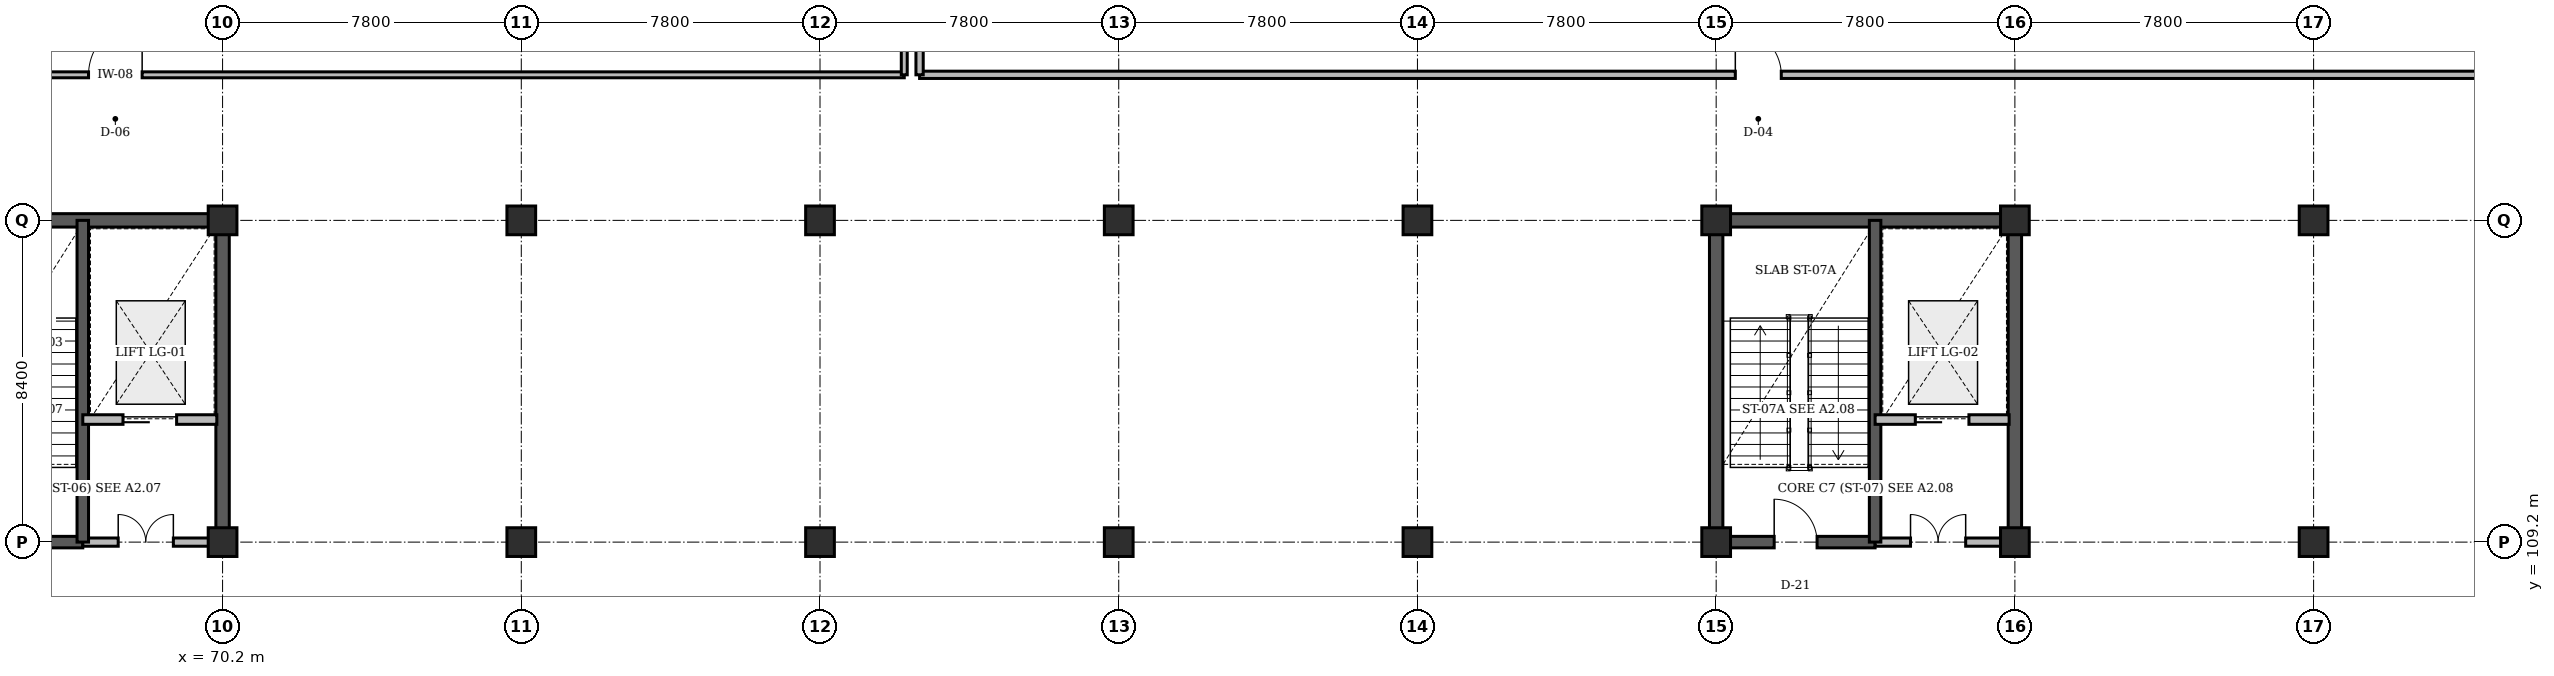
"""IFC4 building model, lengths in metres.
Left out: names, types, materials, properties, quantities, classifications, styles, units other than length and angle.
Written with IfcOpenShell. Run it as: python <this file> out.ifc"""

import sys

from ifc_helpers import new_model, si_unit, direction, frame, frame_2d, origin, origin_2d, place, context, subcontext, project, spatial, rectangle, extrude, element, fill, save


model = new_model("IFC4")
c1 = context("Model", 3, precision=1e-05, world=origin(), true_north=direction((0.0, 1.0)))
c2 = subcontext(c1, "Body", "Model", "MODEL_VIEW")
j1 = project(units=[si_unit("LENGTHUNIT", "METRE"), si_unit("PLANEANGLEUNIT", "RADIAN")], contexts=[c1])
p1 = place(None, origin())
s1 = spatial("IfcSite", under=j1, at=p1, CompositionType="ELEMENT")
p2 = place(p1, origin())
s2 = spatial("IfcBuilding", under=s1, at=p2, CompositionType="ELEMENT")
p3 = place(p2, frame((0.0, 0.0, 4.8)))
s3 = spatial("IfcBuildingStorey", under=s2, at=p3, CompositionType="ELEMENT", Elevation=4.8)
p4 = place(p3, frame((62.225, 117.6, 0.0), z_axis=(0.0, 0.0, 1.0), x_axis=(1.0, 0.0, 0.0)))
e1 = element("IfcWall", 1, at=p4, inside=s3, PredefinedType="SHEAR", context=c2, shape_type="SweptSolid", body=[
    extrude(rectangle(XDim=8.15, YDim=0.35, at=frame_2d((4.075, 0.0))), origin(), (0.0, 0.0, 1.0), 4.48),
])
p5 = place(p3, frame((70.2, 109.2, 0.0), z_axis=(0.0, 0.0, 1.0), x_axis=(0.0, 1.0, 0.0)))
e2 = element("IfcWall", 2, at=p5, inside=s3, PredefinedType="SHEAR", context=c2, shape_type="SweptSolid", body=[
    extrude(rectangle(XDim=8.4, YDim=0.35, at=frame_2d((4.2, 0.0))), origin(), (0.0, 0.0, 1.0), 4.48),
])
p6 = place(p3, frame((109.025, 117.6, 0.0), z_axis=(0.0, 0.0, 1.0), x_axis=(1.0, 0.0, 0.0)))
e3 = element("IfcWall", 3, at=p6, inside=s3, PredefinedType="SHEAR", context=c2, shape_type="SweptSolid", body=[
    extrude(rectangle(XDim=8.15, YDim=0.35, at=frame_2d((4.075, 0.0))), origin(), (0.0, 0.0, 1.0), 4.48),
])
for number, where, z_axis, x_axis in (
    (4, (109.2, 109.2, 0.0), (0.0, 0.0, 1.0), (0.0, 1.0, 0.0)),
    (5, (117.0, 109.2, 0.0), (0.0, 0.0, 1.0), (0.0, 1.0, 0.0)),
):
    element("IfcWall", number, at=place(p3, frame(where, z_axis=z_axis, x_axis=x_axis)), inside=s3, PredefinedType="SHEAR", context=c2, shape_type="SweptSolid", body=[
        extrude(rectangle(XDim=8.4, YDim=0.35, at=frame_2d((4.2, 0.0))), origin(), (0.0, 0.0, 1.0), 4.48),
    ])
for number, where, z_axis, x_axis in (
    (6, (70.2, 109.2, 0.0), (0.0, 0.0, 1.0), (1.0, 0.0, 0.0)),
    (7, (70.2, 117.6, 0.0), (0.0, 0.0, 1.0), (1.0, 0.0, 0.0)),
    (8, (78.0, 109.2, 0.0), (0.0, 0.0, 1.0), (1.0, 0.0, 0.0)),
    (9, (78.0, 117.6, 0.0), (0.0, 0.0, 1.0), (1.0, 0.0, 0.0)),
    (10, (85.8, 109.2, 0.0), (0.0, 0.0, 1.0), (1.0, 0.0, 0.0)),
    (11, (85.8, 117.6, 0.0), (0.0, 0.0, 1.0), (1.0, 0.0, 0.0)),
    (12, (93.6, 109.2, 0.0), (0.0, 0.0, 1.0), (1.0, 0.0, 0.0)),
    (13, (93.6, 117.6, 0.0), (0.0, 0.0, 1.0), (1.0, 0.0, 0.0)),
    (14, (101.4, 109.2, 0.0), (0.0, 0.0, 1.0), (1.0, 0.0, 0.0)),
    (15, (101.4, 117.6, 0.0), (0.0, 0.0, 1.0), (1.0, 0.0, 0.0)),
    (16, (109.2, 109.2, 0.0), (0.0, 0.0, 1.0), (1.0, 0.0, 0.0)),
    (17, (109.2, 117.6, 0.0), (0.0, 0.0, 1.0), (1.0, 0.0, 0.0)),
    (18, (117.0, 109.2, 0.0), (0.0, 0.0, 1.0), (1.0, 0.0, 0.0)),
    (19, (117.0, 117.6, 0.0), (0.0, 0.0, 1.0), (1.0, 0.0, 0.0)),
    (20, (124.8, 109.2, 0.0), (0.0, 0.0, 1.0), (1.0, 0.0, 0.0)),
    (21, (124.8, 117.6, 0.0), (0.0, 0.0, 1.0), (1.0, 0.0, 0.0)),
):
    element("IfcColumn", number, at=place(p3, frame(where, z_axis=z_axis, x_axis=x_axis)), inside=s3, PredefinedType="COLUMN", context=c2, shape_type="SweptSolid", body=[
        extrude(rectangle(XDim=0.75, YDim=0.75, at=origin_2d()), origin(), (0.0, 0.0, 1.0), 4.8),
    ])
p7 = place(p3, frame((62.4, 109.2, 0.0), z_axis=(0.0, 0.0, 1.0), x_axis=(1.0, 0.0, 0.0)))
e22 = element("IfcWall", 22, at=p7, inside=s3, PredefinedType="SHEAR", context=c2, shape_type="SweptSolid", body=[
    extrude(rectangle(XDim=4.15, YDim=0.3, at=frame_2d((2.075, 0.0))), origin(), (0.0, 0.0, 1.0), 4.8),
])
p8 = place(p7, frame((1.515, 0.0, 0.0)))
e23 = element("IfcOpeningElement", 23, at=p8, cuts=e22, PredefinedType="OPENING", context=c2, shape_type="SweptSolid", body=[
    extrude(rectangle(XDim=1.12, YDim=2.15, at=frame_2d((0.56, 1.075))), frame((0.0, 0.16, 0.0), z_axis=(0.0, -1.0, 0.0), x_axis=(1.0, 0.0, 0.0)), (0.0, 0.0, 1.0), 0.32),
])
p9 = place(p3, frame((66.55, 109.2, 0.0), z_axis=(0.0, 0.0, 1.0), x_axis=(1.0, 0.0, 0.0)))
e24 = element("IfcWall", 24, at=p9, inside=s3, PredefinedType="STANDARD", context=c2, shape_type="SweptSolid", body=[
    extrude(rectangle(XDim=3.29, YDim=0.215, at=frame_2d((1.645, 0.0))), origin(), (0.0, 0.0, 1.0), 3.68),
])
p10 = place(p9, frame((0.925, 0.0, 0.0)))
e25 = element("IfcOpeningElement", 25, at=p10, cuts=e24, PredefinedType="OPENING", context=c2, shape_type="SweptSolid", body=[
    extrude(rectangle(XDim=1.44, YDim=2.2, at=frame_2d((0.72, 1.1))), frame((0.0, 0.118, 0.0), z_axis=(0.0, -1.0, 0.0), x_axis=(1.0, 0.0, 0.0)), (0.0, 0.0, 1.0), 0.235),
])
p11 = place(p3, frame((66.55, 109.2, 0.0), z_axis=(0.0, 0.0, 1.0), x_axis=(0.0, 1.0, 0.0)))
e26 = element("IfcWall", 26, at=p11, inside=s3, PredefinedType="SHEAR", context=c2, shape_type="SweptSolid", body=[
    extrude(rectangle(XDim=8.4, YDim=0.3, at=frame_2d((4.2, 0.0))), origin(), (0.0, 0.0, 1.0), 4.8),
])
p12 = place(p3, frame((66.55, 112.4, 0.0), z_axis=(0.0, 0.0, 1.0), x_axis=(1.0, 0.0, 0.0)))
e27 = element("IfcWall", 27, at=p12, inside=s3, PredefinedType="STANDARD", context=c2, shape_type="SweptSolid", body=[
    extrude(rectangle(XDim=3.5, YDim=0.25, at=frame_2d((1.75, 0.0))), origin(), (0.0, 0.0, 1.0), 4.46),
])
p13 = place(p12, frame((1.05, 0.0, 0.0)))
e28 = element("IfcOpeningElement", 28, at=p13, cuts=e27, PredefinedType="OPENING", context=c2, shape_type="SweptSolid", body=[
    extrude(rectangle(XDim=1.4, YDim=2.2, at=frame_2d((0.7, 1.1))), frame((0.0, 0.135, 0.0), z_axis=(0.0, -1.0, 0.0), x_axis=(1.0, 0.0, 0.0)), (0.0, 0.0, 1.0), 0.27),
])
p14 = place(p3, frame((109.2, 109.2, 0.0), z_axis=(0.0, 0.0, 1.0), x_axis=(1.0, 0.0, 0.0)))
e29 = element("IfcWall", 29, at=p14, inside=s3, PredefinedType="SHEAR", context=c2, shape_type="SweptSolid", body=[
    extrude(rectangle(XDim=4.15, YDim=0.3, at=frame_2d((2.075, 0.0))), origin(), (0.0, 0.0, 1.0), 4.8),
])
p15 = place(p14, frame((1.515, 0.0, 0.0)))
e30 = element("IfcOpeningElement", 30, at=p15, cuts=e29, PredefinedType="OPENING", context=c2, shape_type="SweptSolid", body=[
    extrude(rectangle(XDim=1.12, YDim=2.15, at=frame_2d((0.56, 1.075))), frame((0.0, 0.16, 0.0), z_axis=(0.0, -1.0, 0.0), x_axis=(1.0, 0.0, 0.0)), (0.0, 0.0, 1.0), 0.32),
])
p16 = place(p3, frame((113.35, 109.2, 0.0), z_axis=(0.0, 0.0, 1.0), x_axis=(1.0, 0.0, 0.0)))
e31 = element("IfcWall", 31, at=p16, inside=s3, PredefinedType="STANDARD", context=c2, shape_type="SweptSolid", body=[
    extrude(rectangle(XDim=3.29, YDim=0.215, at=frame_2d((1.645, 0.0))), origin(), (0.0, 0.0, 1.0), 3.68),
])
p17 = place(p16, frame((0.925, 0.0, 0.0)))
e32 = element("IfcOpeningElement", 32, at=p17, cuts=e31, PredefinedType="OPENING", context=c2, shape_type="SweptSolid", body=[
    extrude(rectangle(XDim=1.44, YDim=2.2, at=frame_2d((0.72, 1.1))), frame((0.0, 0.118, 0.0), z_axis=(0.0, -1.0, 0.0), x_axis=(1.0, 0.0, 0.0)), (0.0, 0.0, 1.0), 0.235),
])
p18 = place(p3, frame((113.35, 109.2, 0.0), z_axis=(0.0, 0.0, 1.0), x_axis=(0.0, 1.0, 0.0)))
e33 = element("IfcWall", 33, at=p18, inside=s3, PredefinedType="SHEAR", context=c2, shape_type="SweptSolid", body=[
    extrude(rectangle(XDim=8.4, YDim=0.3, at=frame_2d((4.2, 0.0))), origin(), (0.0, 0.0, 1.0), 4.8),
])
p19 = place(p3, frame((113.35, 112.4, 0.0), z_axis=(0.0, 0.0, 1.0), x_axis=(1.0, 0.0, 0.0)))
e34 = element("IfcWall", 34, at=p19, inside=s3, PredefinedType="STANDARD", context=c2, shape_type="SweptSolid", body=[
    extrude(rectangle(XDim=3.5, YDim=0.25, at=frame_2d((1.75, 0.0))), origin(), (0.0, 0.0, 1.0), 4.46),
])
p20 = place(p19, frame((1.05, 0.0, 0.0)))
e35 = element("IfcOpeningElement", 35, at=p20, cuts=e34, PredefinedType="OPENING", context=c2, shape_type="SweptSolid", body=[
    extrude(rectangle(XDim=1.4, YDim=2.2, at=frame_2d((0.7, 1.1))), frame((0.0, 0.135, 0.0), z_axis=(0.0, -1.0, 0.0), x_axis=(1.0, 0.0, 0.0)), (0.0, 0.0, 1.0), 0.27),
])
p21 = place(p3, frame((46.8, 121.4, 0.0), z_axis=(0.0, 0.0, 1.0), x_axis=(1.0, 0.0, 0.0)))
e36 = element("IfcWall", 36, at=p21, inside=s3, PredefinedType="PARTITIONING", context=c2, shape_type="SweptSolid", body=[
    extrude(rectangle(XDim=41.2, YDim=0.155, at=frame_2d((20.6, 0.0))), origin(), (0.0, 0.0, 1.0), 4.46),
])
p22 = place(p21, frame((19.9, 0.0, 0.0)))
e37 = element("IfcOpeningElement", 37, at=p22, cuts=e36, PredefinedType="OPENING", context=c2, shape_type="SweptSolid", body=[
    extrude(rectangle(XDim=1.4, YDim=2.2, at=frame_2d((0.7, 1.1))), frame((0.0, 0.087, 0.0), z_axis=(0.0, -1.0, 0.0), x_axis=(1.0, 0.0, 0.0)), (0.0, 0.0, 1.0), 0.175),
])
p23 = place(p3, frame((88.0, 121.4, 0.0), z_axis=(0.0, 0.0, 1.0), x_axis=(0.0, 1.0, 0.0)))
e38 = element("IfcWall", 38, at=p23, inside=s3, PredefinedType="PARTITIONING", context=c2, shape_type="SweptSolid", body=[
    extrude(rectangle(XDim=12.4, YDim=0.155, at=frame_2d((6.2, 0.0))), origin(), (0.0, 0.0, 1.0), 4.46),
])
p24 = place(p3, frame((88.4, 121.4, 0.0), z_axis=(0.0, 0.0, 1.0), x_axis=(1.0, 0.0, 0.0)))
e39 = element("IfcWall", 39, at=p24, inside=s3, PredefinedType="PARTITIONING", context=c2, shape_type="SweptSolid", body=[
    extrude(rectangle(XDim=43.8, YDim=0.19, at=frame_2d((21.9, 0.0))), origin(), (0.0, 0.0, 1.0), 4.46),
])
p25 = place(p24, frame((21.3, 0.0, 0.0)))
e40 = element("IfcOpeningElement", 40, at=p25, cuts=e39, PredefinedType="OPENING", context=c2, shape_type="SweptSolid", body=[
    extrude(rectangle(XDim=1.2, YDim=2.2, at=frame_2d((0.6, 1.1))), frame((0.0, 0.105, 0.0), z_axis=(0.0, -1.0, 0.0), x_axis=(1.0, 0.0, 0.0)), (0.0, 0.0, 1.0), 0.21),
])
p26 = place(p3, frame((88.4, 121.4, 0.0), z_axis=(0.0, 0.0, 1.0), x_axis=(0.0, 1.0, 0.0)))
e41 = element("IfcWall", 41, at=p26, inside=s3, PredefinedType="PARTITIONING", context=c2, shape_type="SweptSolid", body=[
    extrude(rectangle(XDim=12.4, YDim=0.19, at=frame_2d((6.2, 0.0))), origin(), (0.0, 0.0, 1.0), 4.46),
])
p27 = place(p10, origin())
e42 = element("IfcDoor", 42, at=p27, inside=s3, OperationType="DOUBLE_DOOR_SINGLE_SWING", PredefinedType="DOOR", context=c2, shape_type="SweptSolid", body=[
    extrude(rectangle(XDim=1.44, YDim=2.2, at=frame_2d((0.72, 1.1))), frame((0.0, 0.025, 0.0), z_axis=(0.0, -1.0, 0.0), x_axis=(1.0, 0.0, 0.0)), (0.0, 0.0, 1.0), 0.05),
])
fill(e25, e42)
p28 = place(p13, origin())
e43 = element("IfcDoor", 43, at=p28, inside=s3, OperationType="SLIDING_TO_LEFT", PredefinedType="DOOR", context=c2, shape_type="SweptSolid", body=[
    extrude(rectangle(XDim=1.4, YDim=2.2, at=frame_2d((0.7, 1.1))), frame((0.0, 0.025, 0.0), z_axis=(0.0, -1.0, 0.0), x_axis=(1.0, 0.0, 0.0)), (0.0, 0.0, 1.0), 0.05),
])
fill(e28, e43)
p29 = place(p15, origin())
e44 = element("IfcDoor", 44, at=p29, inside=s3, OperationType="SINGLE_SWING_LEFT", PredefinedType="DOOR", context=c2, shape_type="SweptSolid", body=[
    extrude(rectangle(XDim=1.12, YDim=2.15, at=frame_2d((0.56, 1.075))), frame((0.0, 0.025, 0.0), z_axis=(0.0, -1.0, 0.0), x_axis=(1.0, 0.0, 0.0)), (0.0, 0.0, 1.0), 0.05),
])
fill(e30, e44)
p30 = place(p17, origin())
e45 = element("IfcDoor", 45, at=p30, inside=s3, OperationType="DOUBLE_DOOR_SINGLE_SWING", PredefinedType="DOOR", context=c2, shape_type="SweptSolid", body=[
    extrude(rectangle(XDim=1.44, YDim=2.2, at=frame_2d((0.72, 1.1))), frame((0.0, 0.025, 0.0), z_axis=(0.0, -1.0, 0.0), x_axis=(1.0, 0.0, 0.0)), (0.0, 0.0, 1.0), 0.05),
])
fill(e32, e45)
p31 = place(p20, origin())
e46 = element("IfcDoor", 46, at=p31, inside=s3, OperationType="SLIDING_TO_LEFT", PredefinedType="DOOR", context=c2, shape_type="SweptSolid", body=[
    extrude(rectangle(XDim=1.4, YDim=2.2, at=frame_2d((0.7, 1.1))), frame((0.0, 0.025, 0.0), z_axis=(0.0, -1.0, 0.0), x_axis=(1.0, 0.0, 0.0)), (0.0, 0.0, 1.0), 0.05),
])
fill(e35, e46)
p32 = place(p22, origin())
e47 = element("IfcDoor", 47, at=p32, inside=s3, OperationType="SINGLE_SWING_RIGHT", PredefinedType="DOOR", context=c2, shape_type="SweptSolid", body=[
    extrude(rectangle(XDim=1.4, YDim=2.2, at=frame_2d((0.7, 1.1))), frame((0.0, 0.025, 0.0), z_axis=(0.0, -1.0, 0.0), x_axis=(1.0, 0.0, 0.0)), (0.0, 0.0, 1.0), 0.05),
])
fill(e37, e47)
p33 = place(p25, origin())
e48 = element("IfcDoor", 48, at=p33, inside=s3, OperationType="SINGLE_SWING_LEFT", PredefinedType="DOOR", context=c2, shape_type="SweptSolid", body=[
    extrude(rectangle(XDim=1.2, YDim=2.2, at=frame_2d((0.6, 1.1))), frame((0.0, 0.025, 0.0), z_axis=(0.0, -1.0, 0.0), x_axis=(1.0, 0.0, 0.0)), (0.0, 0.0, 1.0), 0.05),
])
fill(e40, e48)
save(model, sys.argv[1])
